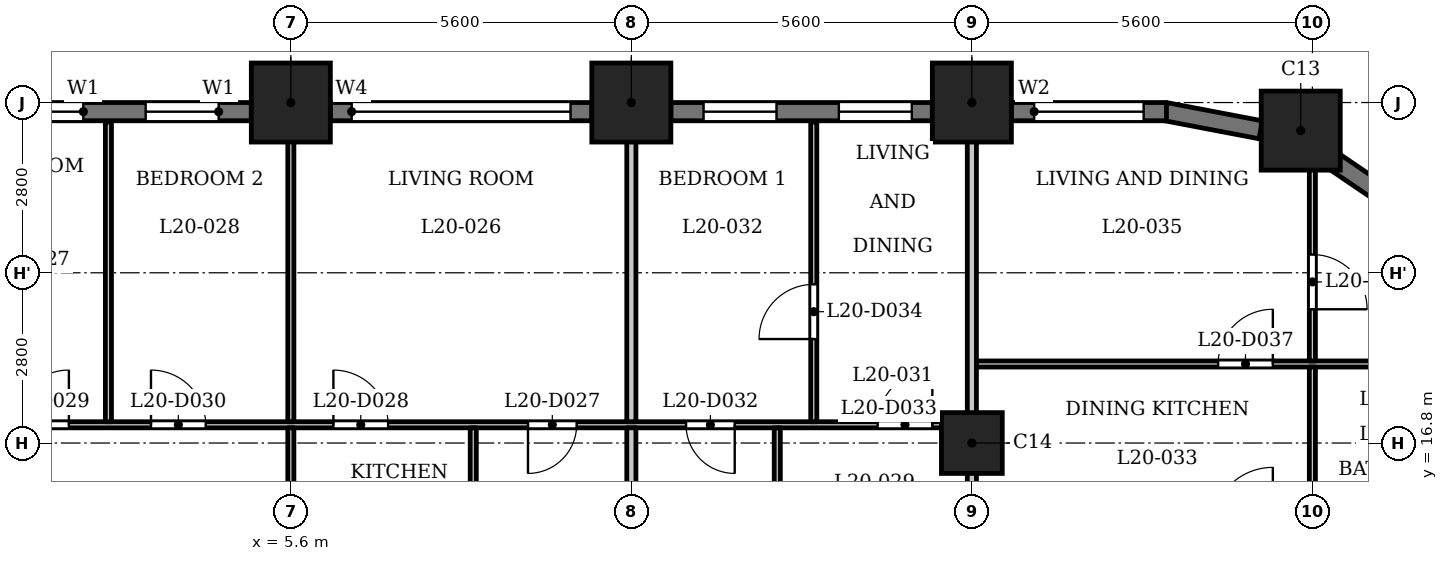
"""IFC4 building model, lengths in metres.
Left out: names, types, materials, properties, quantities, classifications, styles, units other than length and angle.
Written with IfcOpenShell. Run it as: python <this file> out.ifc"""

import sys

from ifc_helpers import new_model, si_unit, direction, frame, frame_2d, origin, origin_2d, place, context, subcontext, project, spatial, rectangle, extrude, element, fill, save


model = new_model("IFC4")
c1 = context("Model", 3, precision=1e-05, world=origin(), true_north=direction((0.0, 1.0)))
c2 = subcontext(c1, "Body", "Model", "MODEL_VIEW")
j1 = project(units=[si_unit("LENGTHUNIT", "METRE"), si_unit("PLANEANGLEUNIT", "RADIAN")], contexts=[c1])
p1 = place(None, origin())
s1 = spatial("IfcSite", under=j1, at=p1, CompositionType="ELEMENT")
p2 = place(p1, origin())
s2 = spatial("IfcBuilding", under=s1, at=p2, CompositionType="ELEMENT")
p3 = place(p2, frame((0.0, 0.0, 83.3)))
s3 = spatial("IfcBuildingStorey", under=s2, at=p3, CompositionType="ELEMENT", Elevation=83.3)
for number, where, z_axis, x_axis in (
    (1, (22.209, 21.938, 0.0), (0.0, 0.0, 1.0), (1.0, 0.0, 0.0)),
    (2, (16.8, 22.4, 0.0), (0.0, 0.0, 1.0), (1.0, 0.0, 0.0)),
    (3, (11.2, 22.4, 0.0), (0.0, 0.0, 1.0), (1.0, 0.0, 0.0)),
    (4, (5.6, 22.4, 0.0), (0.0, 0.0, 1.0), (1.0, 0.0, 0.0)),
):
    element("IfcColumn", number, at=place(p3, frame(where, z_axis=z_axis, x_axis=x_axis)), inside=s3, PredefinedType="COLUMN", context=c2, shape_type="SweptSolid", body=[
        extrude(rectangle(XDim=1.3, YDim=1.3, at=origin_2d()), origin(), (0.0, 0.0, 1.0), 3.5),
    ])
p4 = place(p3, frame((16.8, 16.8, 0.0), z_axis=(0.0, 0.0, 1.0), x_axis=(1.0, 0.0, 0.0)))
e5 = element("IfcColumn", 5, at=p4, inside=s3, PredefinedType="COLUMN", context=c2, shape_type="SweptSolid", body=[
    extrude(rectangle(XDim=1.0, YDim=1.0, at=origin_2d()), origin(), (0.0, 0.0, 1.0), 3.5),
])
p5 = place(p3, frame((23.41, 20.989, 0.0), z_axis=(0.0, 0.0, 1.0), x_axis=(-0.827050703543, 0.562127328787, 0.0)))
e6 = element("IfcWall", 6, at=p5, inside=s3, PredefinedType="SOLIDWALL", context=c2, shape_type="SweptSolid", body=[
    extrude(rectangle(XDim=0.877, YDim=0.3, at=frame_2d((0.438, 0.0))), origin(), (0.0, 0.0, 1.0), 3.2),
])
p6 = place(p3, frame((21.55, 21.952, 0.0), z_axis=(0.0, 0.0, 1.0), x_axis=(-0.982278644094, 0.187426426519, 0.0)))
e7 = element("IfcWall", 7, at=p6, inside=s3, PredefinedType="SOLIDWALL", context=c2, shape_type="SweptSolid", body=[
    extrude(rectangle(XDim=1.606, YDim=0.3, at=frame_2d((0.803, 0.0))), origin(), (0.0, 0.0, 1.0), 2.4),
])
p7 = place(p3, frame((20.0, 22.25, 0.0), z_axis=(0.0, 0.0, 1.0), x_axis=(-1.0, 0.0, 0.0)))
e8 = element("IfcWall", 8, at=p7, inside=s3, PredefinedType="SOLIDWALL", context=c2, shape_type="SweptSolid", body=[
    extrude(rectangle(XDim=2.55, YDim=0.3, at=frame_2d((1.275, 0.0))), origin(), (0.0, 0.0, 1.0), 2.4),
])
p8 = place(p7, frame((0.375, 0.0, 0.9)))
e9 = element("IfcOpeningElement", 9, at=p8, cuts=e8, PredefinedType="OPENING", context=c2, shape_type="SweptSolid", body=[
    extrude(rectangle(XDim=1.8, YDim=1.25, at=frame_2d((0.9, 0.625))), frame((0.0, 0.16, 0.0), z_axis=(0.0, -1.0, 0.0), x_axis=(1.0, 0.0, 0.0)), (0.0, 0.0, 1.0), 0.32),
])
p9 = place(p3, frame((16.15, 22.25, 0.0), z_axis=(0.0, 0.0, 1.0), x_axis=(-1.0, 0.0, 0.0)))
e10 = element("IfcWall", 10, at=p9, inside=s3, PredefinedType="SOLIDWALL", context=c2, shape_type="SweptSolid", body=[
    extrude(rectangle(XDim=4.3, YDim=0.3, at=frame_2d((2.15, 0.0))), origin(), (0.0, 0.0, 1.0), 2.4),
])
p10 = place(p9, frame((0.337, 0.0, 0.6)))
e11 = element("IfcOpeningElement", 11, at=p10, cuts=e10, PredefinedType="OPENING", context=c2, shape_type="SweptSolid", body=[
    extrude(rectangle(XDim=1.2, YDim=1.55, at=frame_2d((0.6, 0.775))), frame((0.0, 0.16, 0.0), z_axis=(0.0, -1.0, 0.0), x_axis=(1.0, 0.0, 0.0)), (0.0, 0.0, 1.0), 0.32),
])
p11 = place(p9, frame((2.562, 0.0, 0.6)))
e12 = element("IfcOpeningElement", 12, at=p11, cuts=e10, PredefinedType="OPENING", context=c2, shape_type="SweptSolid", body=[
    extrude(rectangle(XDim=1.2, YDim=1.55, at=frame_2d((0.6, 0.775))), frame((0.0, 0.16, 0.0), z_axis=(0.0, -1.0, 0.0), x_axis=(1.0, 0.0, 0.0)), (0.0, 0.0, 1.0), 0.32),
])
p12 = place(p3, frame((10.55, 22.25, 0.0), z_axis=(0.0, 0.0, 1.0), x_axis=(-1.0, 0.0, 0.0)))
e13 = element("IfcWall", 13, at=p12, inside=s3, PredefinedType="SOLIDWALL", context=c2, shape_type="SweptSolid", body=[
    extrude(rectangle(XDim=4.3, YDim=0.3, at=frame_2d((2.15, 0.0))), origin(), (0.0, 0.0, 1.0), 2.4),
])
p13 = place(p12, frame((0.35, 0.0, 1.2)))
e14 = element("IfcOpeningElement", 14, at=p13, cuts=e13, PredefinedType="OPENING", context=c2, shape_type="SweptSolid", body=[
    extrude(rectangle(XDim=3.6, YDim=0.95, at=frame_2d((1.8, 0.475))), frame((0.0, 0.16, 0.0), z_axis=(0.0, -1.0, 0.0), x_axis=(1.0, 0.0, 0.0)), (0.0, 0.0, 1.0), 0.32),
])
p14 = place(p3, frame((4.95, 22.25, 0.0), z_axis=(0.0, 0.0, 1.0), x_axis=(-1.0, 0.0, 0.0)))
e15 = element("IfcWall", 15, at=p14, inside=s3, PredefinedType="SOLIDWALL", context=c2, shape_type="SweptSolid", body=[
    extrude(rectangle(XDim=4.3, YDim=0.3, at=frame_2d((2.15, 0.0))), origin(), (0.0, 0.0, 1.0), 2.4),
])
p15 = place(p14, frame((0.538, 0.0, 0.6)))
e16 = element("IfcOpeningElement", 16, at=p15, cuts=e15, PredefinedType="OPENING", context=c2, shape_type="SweptSolid", body=[
    extrude(rectangle(XDim=1.2, YDim=1.55, at=frame_2d((0.6, 0.775))), frame((0.0, 0.16, 0.0), z_axis=(0.0, -1.0, 0.0), x_axis=(1.0, 0.0, 0.0)), (0.0, 0.0, 1.0), 0.32),
])
p16 = place(p14, frame((2.762, 0.0, 0.6)))
e17 = element("IfcOpeningElement", 17, at=p16, cuts=e15, PredefinedType="OPENING", context=c2, shape_type="SweptSolid", body=[
    extrude(rectangle(XDim=1.2, YDim=1.55, at=frame_2d((0.6, 0.775))), frame((0.0, 0.16, 0.0), z_axis=(0.0, -1.0, 0.0), x_axis=(1.0, 0.0, 0.0)), (0.0, 0.0, 1.0), 0.32),
])
p17 = place(p3, frame((-16.725, 17.1, 0.0), z_axis=(0.0, 0.0, 1.0), x_axis=(1.0, 0.0, 0.0)))
e18 = element("IfcWall", 18, at=p17, inside=s3, PredefinedType="PARTITIONING", context=c2, shape_type="SweptSolid", body=[
    extrude(rectangle(XDim=33.45, YDim=0.1, at=frame_2d((16.725, 0.0))), origin(), (0.0, 0.0, 1.0), 3.2),
])
p18 = place(p17, frame((3.925, 0.0, 0.0)))
e19 = element("IfcOpeningElement", 19, at=p18, cuts=e18, PredefinedType="OPENING", context=c2, shape_type="SweptSolid", body=[
    extrude(rectangle(XDim=0.8, YDim=2.1, at=frame_2d((0.4, 1.05))), frame((0.0, 0.06, 0.0), z_axis=(0.0, -1.0, 0.0), x_axis=(1.0, 0.0, 0.0)), (0.0, 0.0, 1.0), 0.12),
])
p19 = place(p17, frame((0.975, 0.0, 0.0)))
e20 = element("IfcOpeningElement", 20, at=p19, cuts=e18, PredefinedType="OPENING", context=c2, shape_type="SweptSolid", body=[
    extrude(rectangle(XDim=0.9, YDim=2.1, at=frame_2d((0.45, 1.05))), frame((0.0, 0.06, 0.0), z_axis=(0.0, -1.0, 0.0), x_axis=(1.0, 0.0, 0.0)), (0.0, 0.0, 1.0), 0.12),
])
p20 = place(p17, frame((6.425, 0.0, 0.0)))
e21 = element("IfcOpeningElement", 21, at=p20, cuts=e18, PredefinedType="OPENING", context=c2, shape_type="SweptSolid", body=[
    extrude(rectangle(XDim=0.8, YDim=2.1, at=frame_2d((0.4, 1.05))), frame((0.0, 0.06, 0.0), z_axis=(0.0, -1.0, 0.0), x_axis=(1.0, 0.0, 0.0)), (0.0, 0.0, 1.0), 0.12),
])
p21 = place(p17, frame((8.825, 0.0, 0.0)))
e22 = element("IfcOpeningElement", 22, at=p21, cuts=e18, PredefinedType="OPENING", context=c2, shape_type="SweptSolid", body=[
    extrude(rectangle(XDim=0.9, YDim=2.1, at=frame_2d((0.45, 1.05))), frame((0.0, 0.06, 0.0), z_axis=(0.0, -1.0, 0.0), x_axis=(1.0, 0.0, 0.0)), (0.0, 0.0, 1.0), 0.12),
])
p22 = place(p17, frame((12.375, 0.0, 0.0)))
e23 = element("IfcOpeningElement", 23, at=p22, cuts=e18, PredefinedType="OPENING", context=c2, shape_type="SweptSolid", body=[
    extrude(rectangle(XDim=0.9, YDim=2.1, at=frame_2d((0.45, 1.05))), frame((0.0, 0.06, 0.0), z_axis=(0.0, -1.0, 0.0), x_axis=(1.0, 0.0, 0.0)), (0.0, 0.0, 1.0), 0.12),
])
p23 = place(p17, frame((14.425, 0.0, 0.0)))
e24 = element("IfcOpeningElement", 24, at=p23, cuts=e18, PredefinedType="OPENING", context=c2, shape_type="SweptSolid", body=[
    extrude(rectangle(XDim=0.9, YDim=2.1, at=frame_2d((0.45, 1.05))), frame((0.0, 0.06, 0.0), z_axis=(0.0, -1.0, 0.0), x_axis=(1.0, 0.0, 0.0)), (0.0, 0.0, 1.0), 0.12),
])
p24 = place(p17, frame((26.225, 0.0, 0.0)))
e25 = element("IfcOpeningElement", 25, at=p24, cuts=e18, PredefinedType="OPENING", context=c2, shape_type="SweptSolid", body=[
    extrude(rectangle(XDim=0.8, YDim=2.1, at=frame_2d((0.4, 1.05))), frame((0.0, 0.06, 0.0), z_axis=(0.0, -1.0, 0.0), x_axis=(1.0, 0.0, 0.0)), (0.0, 0.0, 1.0), 0.12),
])
p25 = place(p17, frame((23.025, 0.0, 0.0)))
e26 = element("IfcOpeningElement", 26, at=p25, cuts=e18, PredefinedType="OPENING", context=c2, shape_type="SweptSolid", body=[
    extrude(rectangle(XDim=0.9, YDim=2.1, at=frame_2d((0.45, 1.05))), frame((0.0, 0.06, 0.0), z_axis=(0.0, -1.0, 0.0), x_axis=(1.0, 0.0, 0.0)), (0.0, 0.0, 1.0), 0.12),
])
p26 = place(p17, frame((17.775, 0.0, 0.0)))
e27 = element("IfcOpeningElement", 27, at=p26, cuts=e18, PredefinedType="OPENING", context=c2, shape_type="SweptSolid", body=[
    extrude(rectangle(XDim=0.9, YDim=2.1, at=frame_2d((0.45, 1.05))), frame((0.0, 0.06, 0.0), z_axis=(0.0, -1.0, 0.0), x_axis=(1.0, 0.0, 0.0)), (0.0, 0.0, 1.0), 0.12),
])
p27 = place(p17, frame((20.025, 0.0, 0.0)))
e28 = element("IfcOpeningElement", 28, at=p27, cuts=e18, PredefinedType="OPENING", context=c2, shape_type="SweptSolid", body=[
    extrude(rectangle(XDim=0.9, YDim=2.1, at=frame_2d((0.45, 1.05))), frame((0.0, 0.06, 0.0), z_axis=(0.0, -1.0, 0.0), x_axis=(1.0, 0.0, 0.0)), (0.0, 0.0, 1.0), 0.12),
])
p28 = place(p17, frame((28.825, 0.0, 0.0)))
e29 = element("IfcOpeningElement", 29, at=p28, cuts=e18, PredefinedType="OPENING", context=c2, shape_type="SweptSolid", body=[
    extrude(rectangle(XDim=0.8, YDim=2.1, at=frame_2d((0.4, 1.05))), frame((0.0, 0.06, 0.0), z_axis=(0.0, -1.0, 0.0), x_axis=(1.0, 0.0, 0.0)), (0.0, 0.0, 1.0), 0.12),
])
p29 = place(p17, frame((31.975, 0.0, 0.0)))
e30 = element("IfcOpeningElement", 30, at=p29, cuts=e18, PredefinedType="OPENING", context=c2, shape_type="SweptSolid", body=[
    extrude(rectangle(XDim=0.9, YDim=2.1, at=frame_2d((0.45, 1.05))), frame((0.0, 0.06, 0.0), z_axis=(0.0, -1.0, 0.0), x_axis=(1.0, 0.0, 0.0)), (0.0, 0.0, 1.0), 0.12),
])
p30 = place(p3, frame((16.875, 18.1, 0.0), z_axis=(0.0, 0.0, 1.0), x_axis=(1.0, 0.0, 0.0)))
e31 = element("IfcWall", 31, at=p30, inside=s3, PredefinedType="PARTITIONING", context=c2, shape_type="SweptSolid", body=[
    extrude(rectangle(XDim=9.315, YDim=0.1, at=frame_2d((4.658, 0.0))), origin(), (0.0, 0.0, 1.0), 3.2),
])
p31 = place(p30, frame((7.425, 0.0, 0.0)))
e32 = element("IfcOpeningElement", 32, at=p31, cuts=e31, PredefinedType="OPENING", context=c2, shape_type="SweptSolid", body=[
    extrude(rectangle(XDim=0.8, YDim=2.1, at=frame_2d((0.4, 1.05))), frame((0.0, 0.06, 0.0), z_axis=(0.0, -1.0, 0.0), x_axis=(1.0, 0.0, 0.0)), (0.0, 0.0, 1.0), 0.12),
])
p32 = place(p30, frame((3.975, 0.0, 0.0)))
e33 = element("IfcOpeningElement", 33, at=p32, cuts=e31, PredefinedType="OPENING", context=c2, shape_type="SweptSolid", body=[
    extrude(rectangle(XDim=0.9, YDim=2.1, at=frame_2d((0.45, 1.05))), frame((0.0, 0.06, 0.0), z_axis=(0.0, -1.0, 0.0), x_axis=(1.0, 0.0, 0.0)), (0.0, 0.0, 1.0), 0.12),
])
p33 = place(p3, frame((2.6, 17.15, 0.0), z_axis=(0.0, 0.0, 1.0), x_axis=(0.0, 1.0, 0.0)))
e34 = element("IfcWall", 34, at=p33, inside=s3, PredefinedType="PARTITIONING", context=c2, shape_type="SweptSolid", body=[
    extrude(rectangle(XDim=4.93, YDim=0.1, at=frame_2d((2.465, 0.0))), origin(), (0.0, 0.0, 1.0), 3.2),
])
p34 = place(p3, frame((5.6, 13.275, 0.0), z_axis=(0.0, 0.0, 1.0), x_axis=(0.0, 1.0, 0.0)))
e35 = element("IfcWall", 35, at=p34, inside=s3, PredefinedType="PARTITIONING", context=c2, shape_type="SweptSolid", body=[
    extrude(rectangle(XDim=3.775, YDim=0.1, at=frame_2d((1.888, 0.0))), origin(), (0.0, 0.0, 1.0), 3.2),
])
p35 = place(p34, frame((0.576, 0.0, 0.0)))
e36 = element("IfcOpeningElement", 36, at=p35, cuts=e35, PredefinedType="OPENING", context=c2, shape_type="SweptSolid", body=[
    extrude(rectangle(XDim=0.9, YDim=2.1, at=frame_2d((0.45, 1.05))), frame((0.0, 0.06, 0.0), z_axis=(0.0, -1.0, 0.0), x_axis=(1.0, 0.0, 0.0)), (0.0, 0.0, 1.0), 0.12),
])
p36 = place(p3, frame((5.6, 17.15, 0.0), z_axis=(0.0, 0.0, 1.0), x_axis=(0.0, 1.0, 0.0)))
e37 = element("IfcWall", 37, at=p36, inside=s3, PredefinedType="PARTITIONING", context=c2, shape_type="SweptSolid", body=[
    extrude(rectangle(XDim=5.88, YDim=0.1, at=frame_2d((2.94, 0.0))), origin(), (0.0, 0.0, 1.0), 3.2),
])
p37 = place(p3, frame((8.6, 13.275, 0.0), z_axis=(0.0, 0.0, 1.0), x_axis=(0.0, 1.0, 0.0)))
e38 = element("IfcWall", 38, at=p37, inside=s3, PredefinedType="PARTITIONING", context=c2, shape_type="SweptSolid", body=[
    extrude(rectangle(XDim=3.775, YDim=0.1, at=frame_2d((1.888, 0.0))), origin(), (0.0, 0.0, 1.0), 3.2),
])
p38 = place(p3, frame((11.2, 13.275, 0.0), z_axis=(0.0, 0.0, 1.0), x_axis=(0.0, 1.0, 0.0)))
e39 = element("IfcWall", 39, at=p38, inside=s3, PredefinedType="PARTITIONING", context=c2, shape_type="SweptSolid", body=[
    extrude(rectangle(XDim=3.775, YDim=0.15, at=frame_2d((1.888, 0.0))), origin(), (0.0, 0.0, 1.0), 3.2),
])
p39 = place(p3, frame((11.2, 17.15, 0.0), z_axis=(0.0, 0.0, 1.0), x_axis=(0.0, 1.0, 0.0)))
e40 = element("IfcWall", 40, at=p39, inside=s3, PredefinedType="PARTITIONING", context=c2, shape_type="SweptSolid", body=[
    extrude(rectangle(XDim=5.88, YDim=0.15, at=frame_2d((2.94, 0.0))), origin(), (0.0, 0.0, 1.0), 3.2),
])
p40 = place(p3, frame((13.6, 13.275, 0.0), z_axis=(0.0, 0.0, 1.0), x_axis=(0.0, 1.0, 0.0)))
e41 = element("IfcWall", 41, at=p40, inside=s3, PredefinedType="PARTITIONING", context=c2, shape_type="SweptSolid", body=[
    extrude(rectangle(XDim=3.775, YDim=0.1, at=frame_2d((1.888, 0.0))), origin(), (0.0, 0.0, 1.0), 3.2),
])
p41 = place(p3, frame((14.2, 17.15, 0.0), z_axis=(0.0, 0.0, 1.0), x_axis=(0.0, 1.0, 0.0)))
e42 = element("IfcWall", 42, at=p41, inside=s3, PredefinedType="PARTITIONING", context=c2, shape_type="SweptSolid", body=[
    extrude(rectangle(XDim=4.93, YDim=0.1, at=frame_2d((2.465, 0.0))), origin(), (0.0, 0.0, 1.0), 3.2),
])
p42 = place(p41, frame((1.36, 0.0, 0.0)))
e43 = element("IfcOpeningElement", 43, at=p42, cuts=e42, PredefinedType="OPENING", context=c2, shape_type="SweptSolid", body=[
    extrude(rectangle(XDim=0.9, YDim=2.1, at=frame_2d((0.45, 1.05))), frame((0.0, 0.06, 0.0), z_axis=(0.0, -1.0, 0.0), x_axis=(1.0, 0.0, 0.0)), (0.0, 0.0, 1.0), 0.12),
])
p43 = place(p3, frame((16.8, 15.475, 0.0), z_axis=(0.0, 0.0, 1.0), x_axis=(0.0, 1.0, 0.0)))
e44 = element("IfcWall", 44, at=p43, inside=s3, PredefinedType="PARTITIONING", context=c2, shape_type="SweptSolid", body=[
    extrude(rectangle(XDim=7.555, YDim=0.15, at=frame_2d((3.777, 0.0))), origin(), (0.0, 0.0, 1.0), 3.2),
])
p44 = place(p3, frame((22.4, 15.475, 0.0), z_axis=(0.0, 0.0, 1.0), x_axis=(0.0, 1.0, 0.0)))
e45 = element("IfcWall", 45, at=p44, inside=s3, PredefinedType="PARTITIONING", context=c2, shape_type="SweptSolid", body=[
    extrude(rectangle(XDim=2.575, YDim=0.1, at=frame_2d((1.288, 0.0))), origin(), (0.0, 0.0, 1.0), 3.2),
])
p45 = place(p3, frame((22.4, 18.15, 0.0), z_axis=(0.0, 0.0, 1.0), x_axis=(0.0, 1.0, 0.0)))
e46 = element("IfcWall", 46, at=p45, inside=s3, PredefinedType="PARTITIONING", context=c2, shape_type="SweptSolid", body=[
    extrude(rectangle(XDim=3.57, YDim=0.1, at=frame_2d((1.785, 0.0))), origin(), (0.0, 0.0, 1.0), 3.2),
])
p46 = place(p45, frame((0.85, 0.0, 0.0)))
e47 = element("IfcOpeningElement", 47, at=p46, cuts=e46, PredefinedType="OPENING", context=c2, shape_type="SweptSolid", body=[
    extrude(rectangle(XDim=0.9, YDim=2.1, at=frame_2d((0.45, 1.05))), frame((0.0, 0.06, 0.0), z_axis=(0.0, -1.0, 0.0), x_axis=(1.0, 0.0, 0.0)), (0.0, 0.0, 1.0), 0.12),
])
p47 = place(p24, origin())
e48 = element("IfcDoor", 48, at=p47, inside=s3, OperationType="SINGLE_SWING_LEFT", PredefinedType="DOOR", context=c2, shape_type="SweptSolid", body=[
    extrude(rectangle(XDim=0.8, YDim=2.1, at=frame_2d((0.4, 1.05))), frame((0.0, 0.025, 0.0), z_axis=(0.0, -1.0, 0.0), x_axis=(1.0, 0.0, 0.0)), (0.0, 0.0, 1.0), 0.05),
])
fill(e25, e48)
p48 = place(p25, origin())
e49 = element("IfcDoor", 49, at=p48, inside=s3, OperationType="SINGLE_SWING_RIGHT", PredefinedType="DOOR", context=c2, shape_type="SweptSolid", body=[
    extrude(rectangle(XDim=0.9, YDim=2.1, at=frame_2d((0.45, 1.05))), frame((0.0, 0.025, 0.0), z_axis=(0.0, -1.0, 0.0), x_axis=(1.0, 0.0, 0.0)), (0.0, 0.0, 1.0), 0.05),
])
fill(e26, e49)
p49 = place(p26, origin())
e50 = element("IfcDoor", 50, at=p49, inside=s3, OperationType="SINGLE_SWING_LEFT", PredefinedType="DOOR", context=c2, shape_type="SweptSolid", body=[
    extrude(rectangle(XDim=0.9, YDim=2.1, at=frame_2d((0.45, 1.05))), frame((0.0, 0.025, 0.0), z_axis=(0.0, -1.0, 0.0), x_axis=(1.0, 0.0, 0.0)), (0.0, 0.0, 1.0), 0.05),
])
fill(e27, e50)
p50 = place(p27, origin())
e51 = element("IfcDoor", 51, at=p50, inside=s3, OperationType="SINGLE_SWING_RIGHT", PredefinedType="DOOR", context=c2, shape_type="SweptSolid", body=[
    extrude(rectangle(XDim=0.9, YDim=2.1, at=frame_2d((0.45, 1.05))), frame((0.0, 0.025, 0.0), z_axis=(0.0, -1.0, 0.0), x_axis=(1.0, 0.0, 0.0)), (0.0, 0.0, 1.0), 0.05),
])
fill(e28, e51)
p51 = place(p28, origin())
e52 = element("IfcDoor", 52, at=p51, inside=s3, OperationType="SINGLE_SWING_RIGHT", PredefinedType="DOOR", context=c2, shape_type="SweptSolid", body=[
    extrude(rectangle(XDim=0.8, YDim=2.1, at=frame_2d((0.4, 1.05))), frame((0.0, 0.025, 0.0), z_axis=(0.0, -1.0, 0.0), x_axis=(1.0, 0.0, 0.0)), (0.0, 0.0, 1.0), 0.05),
])
fill(e29, e52)
p52 = place(p29, origin())
e53 = element("IfcDoor", 53, at=p52, inside=s3, OperationType="SINGLE_SWING_LEFT", PredefinedType="DOOR", context=c2, shape_type="SweptSolid", body=[
    extrude(rectangle(XDim=0.9, YDim=2.1, at=frame_2d((0.45, 1.05))), frame((0.0, 0.025, 0.0), z_axis=(0.0, -1.0, 0.0), x_axis=(1.0, 0.0, 0.0)), (0.0, 0.0, 1.0), 0.05),
])
fill(e30, e53)
p53 = place(p42, origin())
e54 = element("IfcDoor", 54, at=p53, inside=s3, OperationType="SINGLE_SWING_RIGHT", PredefinedType="DOOR", context=c2, shape_type="SweptSolid", body=[
    extrude(rectangle(XDim=0.9, YDim=2.1, at=frame_2d((0.45, 1.05))), frame((0.0, 0.025, 0.0), z_axis=(0.0, -1.0, 0.0), x_axis=(1.0, 0.0, 0.0)), (0.0, 0.0, 1.0), 0.05),
])
fill(e43, e54)
p54 = place(p32, origin())
e55 = element("IfcDoor", 55, at=p54, inside=s3, OperationType="SINGLE_SWING_LEFT", PredefinedType="DOOR", context=c2, shape_type="SweptSolid", body=[
    extrude(rectangle(XDim=0.9, YDim=2.1, at=frame_2d((0.45, 1.05))), frame((0.0, 0.025, 0.0), z_axis=(0.0, -1.0, 0.0), x_axis=(1.0, 0.0, 0.0)), (0.0, 0.0, 1.0), 0.05),
])
fill(e33, e55)
p55 = place(p46, origin())
e56 = element("IfcDoor", 56, at=p55, inside=s3, OperationType="SINGLE_SWING_LEFT", PredefinedType="DOOR", context=c2, shape_type="SweptSolid", body=[
    extrude(rectangle(XDim=0.9, YDim=2.1, at=frame_2d((0.45, 1.05))), frame((0.0, 0.025, 0.0), z_axis=(0.0, -1.0, 0.0), x_axis=(1.0, 0.0, 0.0)), (0.0, 0.0, 1.0), 0.05),
])
fill(e47, e56)
p56 = place(p8, origin())
e57 = element("IfcWindow", 57, at=p56, inside=s3, PartitioningType="SINGLE_PANEL", PredefinedType="WINDOW", context=c2, shape_type="SweptSolid", body=[
    extrude(rectangle(XDim=1.8, YDim=1.25, at=frame_2d((0.9, 0.625))), frame((0.0, 0.03, 0.0), z_axis=(0.0, -1.0, 0.0), x_axis=(1.0, 0.0, 0.0)), (0.0, 0.0, 1.0), 0.06),
])
fill(e9, e57)
p57 = place(p10, origin())
e58 = element("IfcWindow", 58, at=p57, inside=s3, PartitioningType="SINGLE_PANEL", PredefinedType="WINDOW", context=c2, shape_type="SweptSolid", body=[
    extrude(rectangle(XDim=1.2, YDim=1.55, at=frame_2d((0.6, 0.775))), frame((0.0, 0.03, 0.0), z_axis=(0.0, -1.0, 0.0), x_axis=(1.0, 0.0, 0.0)), (0.0, 0.0, 1.0), 0.06),
])
fill(e11, e58)
p58 = place(p11, origin())
e59 = element("IfcWindow", 59, at=p58, inside=s3, PartitioningType="SINGLE_PANEL", PredefinedType="WINDOW", context=c2, shape_type="SweptSolid", body=[
    extrude(rectangle(XDim=1.2, YDim=1.55, at=frame_2d((0.6, 0.775))), frame((0.0, 0.03, 0.0), z_axis=(0.0, -1.0, 0.0), x_axis=(1.0, 0.0, 0.0)), (0.0, 0.0, 1.0), 0.06),
])
fill(e12, e59)
p59 = place(p13, origin())
e60 = element("IfcWindow", 60, at=p59, inside=s3, PartitioningType="SINGLE_PANEL", PredefinedType="WINDOW", context=c2, shape_type="SweptSolid", body=[
    extrude(rectangle(XDim=3.6, YDim=0.95, at=frame_2d((1.8, 0.475))), frame((0.0, 0.03, 0.0), z_axis=(0.0, -1.0, 0.0), x_axis=(1.0, 0.0, 0.0)), (0.0, 0.0, 1.0), 0.06),
])
fill(e14, e60)
p60 = place(p15, origin())
e61 = element("IfcWindow", 61, at=p60, inside=s3, PartitioningType="SINGLE_PANEL", PredefinedType="WINDOW", context=c2, shape_type="SweptSolid", body=[
    extrude(rectangle(XDim=1.2, YDim=1.55, at=frame_2d((0.6, 0.775))), frame((0.0, 0.03, 0.0), z_axis=(0.0, -1.0, 0.0), x_axis=(1.0, 0.0, 0.0)), (0.0, 0.0, 1.0), 0.06),
])
fill(e16, e61)
p61 = place(p16, origin())
e62 = element("IfcWindow", 62, at=p61, inside=s3, PartitioningType="SINGLE_PANEL", PredefinedType="WINDOW", context=c2, shape_type="SweptSolid", body=[
    extrude(rectangle(XDim=1.2, YDim=1.55, at=frame_2d((0.6, 0.775))), frame((0.0, 0.03, 0.0), z_axis=(0.0, -1.0, 0.0), x_axis=(1.0, 0.0, 0.0)), (0.0, 0.0, 1.0), 0.06),
])
fill(e17, e62)
save(model, sys.argv[1])
